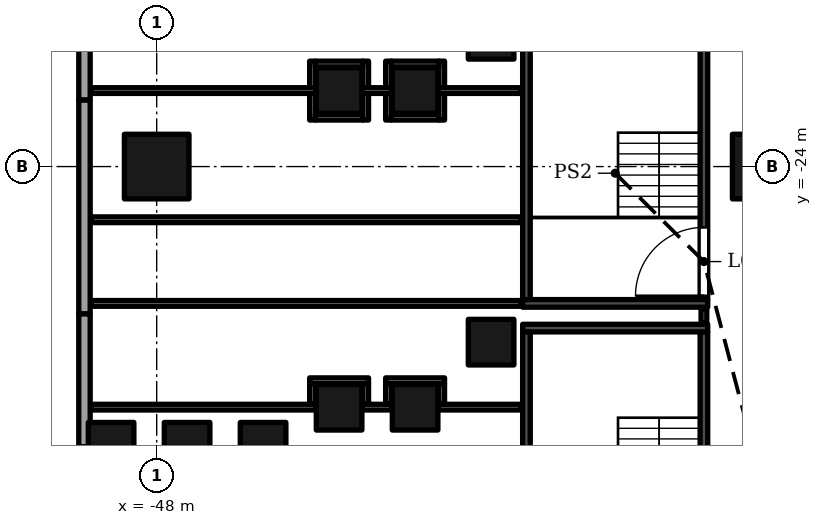
"""IFC4 building model, lengths in metres.
Left out: names, types, materials, properties, quantities, classifications, styles, units other than length and angle.
Written with IfcOpenShell. Run it as: python <this file> out.ifc"""

import sys

from ifc_helpers import new_model, si_unit, direction, frame, frame_2d, origin, origin_2d, place, context, subcontext, project, spatial, rectangle, extrude, element, fill, save


model = new_model("IFC4")
c1 = context("Model", 3, precision=1e-05, world=origin(), true_north=direction((0.0, 1.0)))
c2 = subcontext(c1, "Body", "Model", "MODEL_VIEW")
j1 = project(units=[si_unit("LENGTHUNIT", "METRE"), si_unit("PLANEANGLEUNIT", "RADIAN")], contexts=[c1])
p1 = place(None, origin())
s1 = spatial("IfcSite", under=j1, at=p1, CompositionType="ELEMENT")
p2 = place(p1, origin())
s2 = spatial("IfcBuilding", under=s1, at=p2, CompositionType="ELEMENT")
p3 = place(p2, origin())
s3 = spatial("IfcBuildingStorey", under=s2, at=p3, CompositionType="ELEMENT", Elevation=0.0)
for number, where, z_axis, x_axis in (
    (1, (-48.0, -24.0, 0.0), (0.0, 0.0, 1.0), (1.0, 0.0, 0.0)),
    (2, (-32.0, -24.0, 0.0), (0.0, 0.0, 1.0), (1.0, 0.0, 0.0)),
):
    element("IfcColumn", number, at=place(p3, frame(where, z_axis=z_axis, x_axis=x_axis)), inside=s3, PredefinedType="COLUMN", context=c2, shape_type="SweptSolid", body=[
        extrude(rectangle(XDim=1.7, YDim=1.7, at=origin_2d()), origin(), (0.0, 0.0, 1.0), 9.0),
    ])
for number, where, z_axis, x_axis in (
    (3, (-39.2, -28.62, 0.0), (0.0, 0.0, 1.0), (1.0, 0.0, 0.0)),
    (4, (-39.2, -20.572, 0.0), (0.0, 0.0, 1.0), (1.0, 0.0, 0.0)),
    (5, (-41.2, -30.333, 0.0), (0.0, 0.0, 1.0), (1.0, 0.0, 0.0)),
    (6, (-41.2, -22.001, 0.0), (0.0, 0.0, 1.0), (1.0, 0.0, 0.0)),
    (7, (-43.2, -30.333, 0.0), (0.0, 0.0, 1.0), (1.0, 0.0, 0.0)),
    (8, (-43.2, -22.001, 0.0), (0.0, 0.0, 1.0), (1.0, 0.0, 0.0)),
    (9, (-45.2, -31.333, 0.0), (0.0, 0.0, 1.0), (1.0, 0.0, 0.0)),
    (10, (-47.2, -31.333, 0.0), (0.0, 0.0, 1.0), (1.0, 0.0, 0.0)),
    (11, (-49.2, -31.333, 0.0), (0.0, 0.0, 1.0), (1.0, 0.0, 0.0)),
):
    element("IfcColumn", number, at=place(p3, frame(where, z_axis=z_axis, x_axis=x_axis)), inside=s3, PredefinedType="COLUMN", context=c2, shape_type="SweptSolid", body=[
        extrude(rectangle(XDim=1.2, YDim=1.2, at=origin_2d()), origin(), (0.0, 0.0, 1.0), 9.0),
    ])
p4 = place(p3, frame((-49.9, -13.702, 0.0), z_axis=(0.0, 0.0, 1.0), x_axis=(0.0, -1.0, 0.0)))
e12 = element("IfcWall", 12, at=p4, inside=s3, PredefinedType="ELEMENTEDWALL", context=c2, shape_type="SweptSolid", body=[
    extrude(rectangle(XDim=8.55, YDim=0.3, at=frame_2d((4.275, 0.0))), origin(), (0.0, 0.0, 1.0), 7.6),
])
p5 = place(p4, frame((2.302, 0.0, 0.0)))
e13 = element("IfcOpeningElement", 13, at=p5, cuts=e12, PredefinedType="OPENING", context=c2, shape_type="SweptSolid", body=[
    extrude(rectangle(XDim=3.0, YDim=2.7, at=frame_2d((1.5, 1.35))), frame((0.0, 0.16, 0.0), z_axis=(0.0, -1.0, 0.0), x_axis=(1.0, 0.0, 0.0)), (0.0, 0.0, 1.0), 0.32),
])
p6 = place(p3, frame((-49.9, -22.252, 0.0), z_axis=(0.0, 0.0, 1.0), x_axis=(0.0, -1.0, 0.0)))
e14 = element("IfcWall", 14, at=p6, inside=s3, PredefinedType="ELEMENTEDWALL", context=c2, shape_type="SweptSolid", body=[
    extrude(rectangle(XDim=5.625, YDim=0.3, at=frame_2d((2.812, 0.0))), origin(), (0.0, 0.0, 1.0), 7.6),
])
p7 = place(p6, frame((3.248, 0.0, 0.0)))
e15 = element("IfcOpeningElement", 15, at=p7, cuts=e14, PredefinedType="OPENING", context=c2, shape_type="SweptSolid", body=[
    extrude(rectangle(XDim=2.0, YDim=2.4, at=frame_2d((1.0, 1.2))), frame((0.0, 0.16, 0.0), z_axis=(0.0, -1.0, 0.0), x_axis=(1.0, 0.0, 0.0)), (0.0, 0.0, 1.0), 0.32),
])
p8 = place(p3, frame((-49.9, -27.877, 0.0), z_axis=(0.0, 0.0, 1.0), x_axis=(0.0, -1.0, 0.0)))
e16 = element("IfcWall", 16, at=p8, inside=s3, PredefinedType="ELEMENTEDWALL", context=c2, shape_type="SweptSolid", body=[
    extrude(rectangle(XDim=3.5, YDim=0.3, at=frame_2d((1.75, 0.0))), origin(), (0.0, 0.0, 1.0), 7.6),
])
p9 = place(p8, frame((0.377, 0.0, 0.0)))
e17 = element("IfcOpeningElement", 17, at=p9, cuts=e16, PredefinedType="OPENING", context=c2, shape_type="SweptSolid", body=[
    extrude(rectangle(XDim=1.5, YDim=2.7, at=frame_2d((0.75, 1.35))), frame((0.0, 0.16, 0.0), z_axis=(0.0, -1.0, 0.0), x_axis=(1.0, 0.0, 0.0)), (0.0, 0.0, 1.0), 0.32),
])
for number, where, z_axis, x_axis in (
    (18, (-49.85, -10.605, 9.0), (0.0, 0.0, 1.0), (0.0, -1.0, 0.0)),
    (19, (-49.85, -25.302, 9.0), (0.0, 0.0, 1.0), (0.0, -1.0, 0.0)),
):
    element("IfcWall", number, at=place(p3, frame(where, z_axis=z_axis, x_axis=x_axis)), inside=s3, PredefinedType="PARAPET", context=c2, shape_type="SweptSolid", body=[
        extrude(rectangle(XDim=14.698, YDim=0.3, at=frame_2d((7.349, 0.0))), origin(), (0.0, 0.0, 1.0), 1.1),
    ])
p10 = place(p3, frame((-38.37, -28.25, 0.0), z_axis=(0.0, 0.0, 1.0), x_axis=(1.0, 0.0, 0.0)))
e20 = element("IfcWall", 20, at=p10, inside=s3, PredefinedType="SOLIDWALL", context=c2, shape_type="SweptSolid", body=[
    extrude(rectangle(XDim=4.87, YDim=0.2, at=frame_2d((2.435, 0.0))), origin(), (0.0, 0.0, 1.0), 8.5),
])
p11 = place(p3, frame((-38.27, -35.0, 0.0), z_axis=(0.0, 0.0, 1.0), x_axis=(0.0, 1.0, 0.0)))
e21 = element("IfcWall", 21, at=p11, inside=s3, PredefinedType="SOLIDWALL", context=c2, shape_type="SweptSolid", body=[
    extrude(rectangle(XDim=6.65, YDim=0.2, at=frame_2d((3.325, 0.0))), origin(), (0.0, 0.0, 1.0), 8.5),
])
p12 = place(p11, frame((0.1, 0.0, 0.0)))
e22 = element("IfcOpeningElement", 22, at=p12, cuts=e21, PredefinedType="OPENING", context=c2, shape_type="SweptSolid", body=[
    extrude(rectangle(XDim=1.8, YDim=2.4, at=frame_2d((0.9, 1.2))), frame((0.0, 0.11, 0.0), z_axis=(0.0, -1.0, 0.0), x_axis=(1.0, 0.0, 0.0)), (0.0, 0.0, 1.0), 0.22),
])
p13 = place(p3, frame((-33.6, -35.0, 0.0), z_axis=(0.0, 0.0, 1.0), x_axis=(0.0, 1.0, 0.0)))
e23 = element("IfcWall", 23, at=p13, inside=s3, PredefinedType="SOLIDWALL", context=c2, shape_type="SweptSolid", body=[
    extrude(rectangle(XDim=6.65, YDim=0.2, at=frame_2d((3.325, 0.0))), origin(), (0.0, 0.0, 1.0), 8.5),
])
p14 = place(p13, frame((0.1, 0.0, 0.0)))
e24 = element("IfcOpeningElement", 24, at=p14, cuts=e23, PredefinedType="OPENING", context=c2, shape_type="SweptSolid", body=[
    extrude(rectangle(XDim=1.8, YDim=2.4, at=frame_2d((0.9, 1.2))), frame((0.0, 0.11, 0.0), z_axis=(0.0, -1.0, 0.0), x_axis=(1.0, 0.0, 0.0)), (0.0, 0.0, 1.0), 0.22),
])
p15 = place(p3, frame((-38.37, -27.6, 0.0), z_axis=(0.0, 0.0, 1.0), x_axis=(1.0, 0.0, 0.0)))
e25 = element("IfcWall", 25, at=p15, inside=s3, PredefinedType="SOLIDWALL", context=c2, shape_type="SweptSolid", body=[
    extrude(rectangle(XDim=4.87, YDim=0.2, at=frame_2d((2.435, 0.0))), origin(), (0.0, 0.0, 1.0), 8.5),
])
p16 = place(p3, frame((-38.27, -27.5, 0.0), z_axis=(0.0, 0.0, 1.0), x_axis=(0.0, 1.0, 0.0)))
e26 = element("IfcWall", 26, at=p16, inside=s3, PredefinedType="SOLIDWALL", context=c2, shape_type="SweptSolid", body=[
    extrude(rectangle(XDim=6.65, YDim=0.2, at=frame_2d((3.325, 0.0))), origin(), (0.0, 0.0, 1.0), 8.5),
])
p17 = place(p16, frame((0.1, 0.0, 0.0)))
e27 = element("IfcOpeningElement", 27, at=p17, cuts=e26, PredefinedType="OPENING", context=c2, shape_type="SweptSolid", body=[
    extrude(rectangle(XDim=1.8, YDim=2.4, at=frame_2d((0.9, 1.2))), frame((0.0, 0.11, 0.0), z_axis=(0.0, -1.0, 0.0), x_axis=(1.0, 0.0, 0.0)), (0.0, 0.0, 1.0), 0.22),
])
p18 = place(p3, frame((-33.6, -27.5, 0.0), z_axis=(0.0, 0.0, 1.0), x_axis=(0.0, 1.0, 0.0)))
e28 = element("IfcWall", 28, at=p18, inside=s3, PredefinedType="SOLIDWALL", context=c2, shape_type="SweptSolid", body=[
    extrude(rectangle(XDim=6.65, YDim=0.2, at=frame_2d((3.325, 0.0))), origin(), (0.0, 0.0, 1.0), 8.5),
])
p19 = place(p18, frame((0.1, 0.0, 0.0)))
e29 = element("IfcOpeningElement", 29, at=p19, cuts=e28, PredefinedType="OPENING", context=c2, shape_type="SweptSolid", body=[
    extrude(rectangle(XDim=1.8, YDim=2.4, at=frame_2d((0.9, 1.2))), frame((0.0, 0.11, 0.0), z_axis=(0.0, -1.0, 0.0), x_axis=(1.0, 0.0, 0.0)), (0.0, 0.0, 1.0), 0.22),
])
p20 = place(p3, frame((-49.72, -30.33, 0.0), z_axis=(0.0, 0.0, 1.0), x_axis=(1.0, 0.0, 0.0)))
e30 = element("IfcWall", 30, at=p20, inside=s3, PredefinedType="PARTITIONING", context=c2, shape_type="SweptSolid", body=[
    extrude(rectangle(XDim=5.92, YDim=0.15, at=frame_2d((2.96, 0.0))), origin(), (0.0, 0.0, 1.0), 7.6),
])
p21 = place(p3, frame((-42.6, -30.33, 0.0), z_axis=(0.0, 0.0, 1.0), x_axis=(1.0, 0.0, 0.0)))
e31 = element("IfcWall", 31, at=p21, inside=s3, PredefinedType="PARTITIONING", context=c2, shape_type="SweptSolid", body=[
    extrude(rectangle(XDim=0.8, YDim=0.15, at=frame_2d((0.4, 0.0))), origin(), (0.0, 0.0, 1.0), 8.5),
])
p22 = place(p3, frame((-40.6, -30.33, 0.0), z_axis=(0.0, 0.0, 1.0), x_axis=(1.0, 0.0, 0.0)))
e32 = element("IfcWall", 32, at=p22, inside=s3, PredefinedType="PARTITIONING", context=c2, shape_type="SweptSolid", body=[
    extrude(rectangle(XDim=2.19, YDim=0.15, at=frame_2d((1.095, 0.0))), origin(), (0.0, 0.0, 1.0), 8.5),
])
for number, where, z_axis, x_axis in (
    (33, (-43.9, -30.255, 0.0), (0.0, 0.0, 1.0), (0.0, 1.0, 0.0)),
    (34, (-42.5, -30.255, 0.0), (0.0, 0.0, 1.0), (0.0, 1.0, 0.0)),
    (35, (-41.9, -30.255, 0.0), (0.0, 0.0, 1.0), (0.0, 1.0, 0.0)),
    (36, (-40.5, -30.255, 0.0), (0.0, 0.0, 1.0), (0.0, 1.0, 0.0)),
):
    element("IfcWall", number, at=place(p3, frame(where, z_axis=z_axis, x_axis=x_axis)), inside=s3, PredefinedType="PARTITIONING", context=c2, shape_type="SweptSolid", body=[
        extrude(rectangle(XDim=0.545, YDim=0.15, at=frame_2d((0.272, 0.0))), origin(), (0.0, 0.0, 1.0), 8.5),
    ])
for number, where, z_axis, x_axis in (
    (37, (-43.975, -29.635, 0.0), (0.0, 0.0, 1.0), (1.0, 0.0, 0.0)),
    (38, (-41.975, -29.635, 0.0), (0.0, 0.0, 1.0), (1.0, 0.0, 0.0)),
):
    element("IfcWall", number, at=place(p3, frame(where, z_axis=z_axis, x_axis=x_axis)), inside=s3, PredefinedType="PARTITIONING", context=c2, shape_type="SweptSolid", body=[
        extrude(rectangle(XDim=1.55, YDim=0.15, at=frame_2d((0.775, 0.0))), origin(), (0.0, 0.0, 1.0), 8.5),
    ])
p23 = place(p3, frame((-33.6, -28.11, 0.0), z_axis=(0.0, 0.0, 1.0), x_axis=(0.0, 1.0, 0.0)))
e39 = element("IfcWall", 39, at=p23, inside=s3, PredefinedType="PARTITIONING", context=c2, shape_type="SweptSolid", body=[
    extrude(rectangle(XDim=0.37, YDim=0.15, at=frame_2d((0.185, 0.0))), origin(), (0.0, 0.0, 1.0), 8.5),
])
p24 = place(p3, frame((-49.72, -27.601, 0.0), z_axis=(0.0, 0.0, 1.0), x_axis=(1.0, 0.0, 0.0)))
e40 = element("IfcWall", 40, at=p24, inside=s3, PredefinedType="PARTITIONING", context=c2, shape_type="SweptSolid", body=[
    extrude(rectangle(XDim=11.31, YDim=0.151, at=frame_2d((5.655, 0.0))), origin(), (0.0, 0.0, 1.0), 7.6),
])
p25 = place(p24, frame((5.155, 0.0, 0.0)))
e41 = element("IfcOpeningElement", 41, at=p25, cuts=e40, PredefinedType="OPENING", context=c2, shape_type="SweptSolid", body=[
    extrude(rectangle(XDim=1.2, YDim=2.1, at=frame_2d((0.6, 1.05))), frame((0.0, 0.085, 0.0), z_axis=(0.0, -1.0, 0.0), x_axis=(1.0, 0.0, 0.0)), (0.0, 0.0, 1.0), 0.171),
])
p26 = place(p3, frame((-49.72, -25.399, 0.0), z_axis=(0.0, 0.0, 1.0), x_axis=(1.0, 0.0, 0.0)))
e42 = element("IfcWall", 42, at=p26, inside=s3, PredefinedType="PARTITIONING", context=c2, shape_type="SweptSolid", body=[
    extrude(rectangle(XDim=11.31, YDim=0.151, at=frame_2d((5.655, 0.0))), origin(), (0.0, 0.0, 1.0), 7.6),
])
p27 = place(p26, frame((5.07, 0.0, 0.0)))
e43 = element("IfcOpeningElement", 43, at=p27, cuts=e42, PredefinedType="OPENING", context=c2, shape_type="SweptSolid", body=[
    extrude(rectangle(XDim=1.2, YDim=2.1, at=frame_2d((0.6, 1.05))), frame((0.0, 0.085, 0.0), z_axis=(0.0, -1.0, 0.0), x_axis=(1.0, 0.0, 0.0)), (0.0, 0.0, 1.0), 0.171),
])
p28 = place(p3, frame((-43.9, -22.776, 0.0), z_axis=(0.0, 0.0, 1.0), x_axis=(0.0, 1.0, 0.0)))
e44 = element("IfcWall", 44, at=p28, inside=s3, PredefinedType="PARTITIONING", context=c2, shape_type="SweptSolid", body=[
    extrude(rectangle(XDim=1.55, YDim=0.15, at=frame_2d((0.775, 0.0))), origin(), (0.0, 0.0, 1.0), 8.5),
])
p29 = place(p3, frame((-43.825, -22.701, 0.0), z_axis=(0.0, 0.0, 1.0), x_axis=(1.0, 0.0, 0.0)))
e45 = element("IfcWall", 45, at=p29, inside=s3, PredefinedType="PARTITIONING", context=c2, shape_type="SweptSolid", body=[
    extrude(rectangle(XDim=1.25, YDim=0.15, at=frame_2d((0.625, 0.0))), origin(), (0.0, 0.0, 1.0), 8.5),
])
for number, where, z_axis, x_axis in (
    (46, (-42.5, -22.776, 0.0), (0.0, 0.0, 1.0), (0.0, 1.0, 0.0)),
    (47, (-41.9, -22.776, 0.0), (0.0, 0.0, 1.0), (0.0, 1.0, 0.0)),
):
    element("IfcWall", number, at=place(p3, frame(where, z_axis=z_axis, x_axis=x_axis)), inside=s3, PredefinedType="PARTITIONING", context=c2, shape_type="SweptSolid", body=[
        extrude(rectangle(XDim=1.55, YDim=0.15, at=frame_2d((0.775, 0.0))), origin(), (0.0, 0.0, 1.0), 8.5),
    ])
p30 = place(p3, frame((-41.825, -22.701, 0.0), z_axis=(0.0, 0.0, 1.0), x_axis=(1.0, 0.0, 0.0)))
e48 = element("IfcWall", 48, at=p30, inside=s3, PredefinedType="PARTITIONING", context=c2, shape_type="SweptSolid", body=[
    extrude(rectangle(XDim=1.25, YDim=0.15, at=frame_2d((0.625, 0.0))), origin(), (0.0, 0.0, 1.0), 8.5),
])
p31 = place(p3, frame((-40.5, -22.776, 0.0), z_axis=(0.0, 0.0, 1.0), x_axis=(0.0, 1.0, 0.0)))
e49 = element("IfcWall", 49, at=p31, inside=s3, PredefinedType="PARTITIONING", context=c2, shape_type="SweptSolid", body=[
    extrude(rectangle(XDim=1.55, YDim=0.15, at=frame_2d((0.775, 0.0))), origin(), (0.0, 0.0, 1.0), 8.5),
])
p32 = place(p3, frame((-49.72, -22.0, 0.0), z_axis=(0.0, 0.0, 1.0), x_axis=(1.0, 0.0, 0.0)))
e50 = element("IfcWall", 50, at=p32, inside=s3, PredefinedType="PARTITIONING", context=c2, shape_type="SweptSolid", body=[
    extrude(rectangle(XDim=5.92, YDim=0.15, at=frame_2d((2.96, 0.0))), origin(), (0.0, 0.0, 1.0), 7.6),
])
p33 = place(p3, frame((-42.6, -22.0, 0.0), z_axis=(0.0, 0.0, 1.0), x_axis=(1.0, 0.0, 0.0)))
e51 = element("IfcWall", 51, at=p33, inside=s3, PredefinedType="PARTITIONING", context=c2, shape_type="SweptSolid", body=[
    extrude(rectangle(XDim=0.8, YDim=0.15, at=frame_2d((0.4, 0.0))), origin(), (0.0, 0.0, 1.0), 8.5),
])
p34 = place(p3, frame((-40.6, -22.0, 0.0), z_axis=(0.0, 0.0, 1.0), x_axis=(1.0, 0.0, 0.0)))
e52 = element("IfcWall", 52, at=p34, inside=s3, PredefinedType="PARTITIONING", context=c2, shape_type="SweptSolid", body=[
    extrude(rectangle(XDim=2.19, YDim=0.15, at=frame_2d((1.095, 0.0))), origin(), (0.0, 0.0, 1.0), 8.5),
])
for number, where, z_axis, x_axis in (
    (53, (-43.825, -21.301, 0.0), (0.0, 0.0, 1.0), (1.0, 0.0, 0.0)),
    (54, (-41.825, -21.301, 0.0), (0.0, 0.0, 1.0), (1.0, 0.0, 0.0)),
):
    element("IfcWall", number, at=place(p3, frame(where, z_axis=z_axis, x_axis=x_axis)), inside=s3, PredefinedType="PARTITIONING", context=c2, shape_type="SweptSolid", body=[
        extrude(rectangle(XDim=1.25, YDim=0.15, at=frame_2d((0.625, 0.0))), origin(), (0.0, 0.0, 1.0), 8.5),
    ])
p35 = place(p7, origin())
e55 = element("IfcDoor", 55, at=p35, inside=s3, OperationType="DOUBLE_DOOR_SINGLE_SWING", PredefinedType="DOOR", context=c2, shape_type="SweptSolid", body=[
    extrude(rectangle(XDim=2.0, YDim=2.4, at=frame_2d((1.0, 1.2))), frame((0.0, 0.025, 0.0), z_axis=(0.0, -1.0, 0.0), x_axis=(1.0, 0.0, 0.0)), (0.0, 0.0, 1.0), 0.05),
])
fill(e15, e55)
p36 = place(p9, origin())
e56 = element("IfcDoor", 56, at=p36, inside=s3, OperationType="DOUBLE_DOOR_SINGLE_SWING", PredefinedType="DOOR", context=c2, shape_type="SweptSolid", body=[
    extrude(rectangle(XDim=1.5, YDim=2.7, at=frame_2d((0.75, 1.35))), frame((0.0, 0.025, 0.0), z_axis=(0.0, -1.0, 0.0), x_axis=(1.0, 0.0, 0.0)), (0.0, 0.0, 1.0), 0.05),
])
fill(e17, e56)
p37 = place(p19, origin())
e57 = element("IfcDoor", 57, at=p37, inside=s3, OperationType="DOUBLE_DOOR_SINGLE_SWING", PredefinedType="DOOR", context=c2, shape_type="SweptSolid", body=[
    extrude(rectangle(XDim=1.8, YDim=2.4, at=frame_2d((0.9, 1.2))), frame((0.0, 0.025, 0.0), z_axis=(0.0, -1.0, 0.0), x_axis=(1.0, 0.0, 0.0)), (0.0, 0.0, 1.0), 0.05),
])
fill(e29, e57)
p38 = place(p17, origin())
e58 = element("IfcDoor", 58, at=p38, inside=s3, OperationType="DOUBLE_DOOR_SINGLE_SWING", PredefinedType="DOOR", context=c2, shape_type="SweptSolid", body=[
    extrude(rectangle(XDim=1.8, YDim=2.4, at=frame_2d((0.9, 1.2))), frame((0.0, 0.025, 0.0), z_axis=(0.0, -1.0, 0.0), x_axis=(1.0, 0.0, 0.0)), (0.0, 0.0, 1.0), 0.05),
])
fill(e27, e58)
p39 = place(p25, origin())
e59 = element("IfcDoor", 59, at=p39, inside=s3, OperationType="SINGLE_SWING_LEFT", PredefinedType="DOOR", context=c2, shape_type="SweptSolid", body=[
    extrude(rectangle(XDim=1.2, YDim=2.1, at=frame_2d((0.6, 1.05))), frame((0.0, 0.025, 0.0), z_axis=(0.0, -1.0, 0.0), x_axis=(1.0, 0.0, 0.0)), (0.0, 0.0, 1.0), 0.05),
])
fill(e41, e59)
p40 = place(p27, origin())
e60 = element("IfcDoor", 60, at=p40, inside=s3, OperationType="SINGLE_SWING_LEFT", PredefinedType="DOOR", context=c2, shape_type="SweptSolid", body=[
    extrude(rectangle(XDim=1.2, YDim=2.1, at=frame_2d((0.6, 1.05))), frame((0.0, 0.025, 0.0), z_axis=(0.0, -1.0, 0.0), x_axis=(1.0, 0.0, 0.0)), (0.0, 0.0, 1.0), 0.05),
])
fill(e43, e60)
save(model, sys.argv[1])
